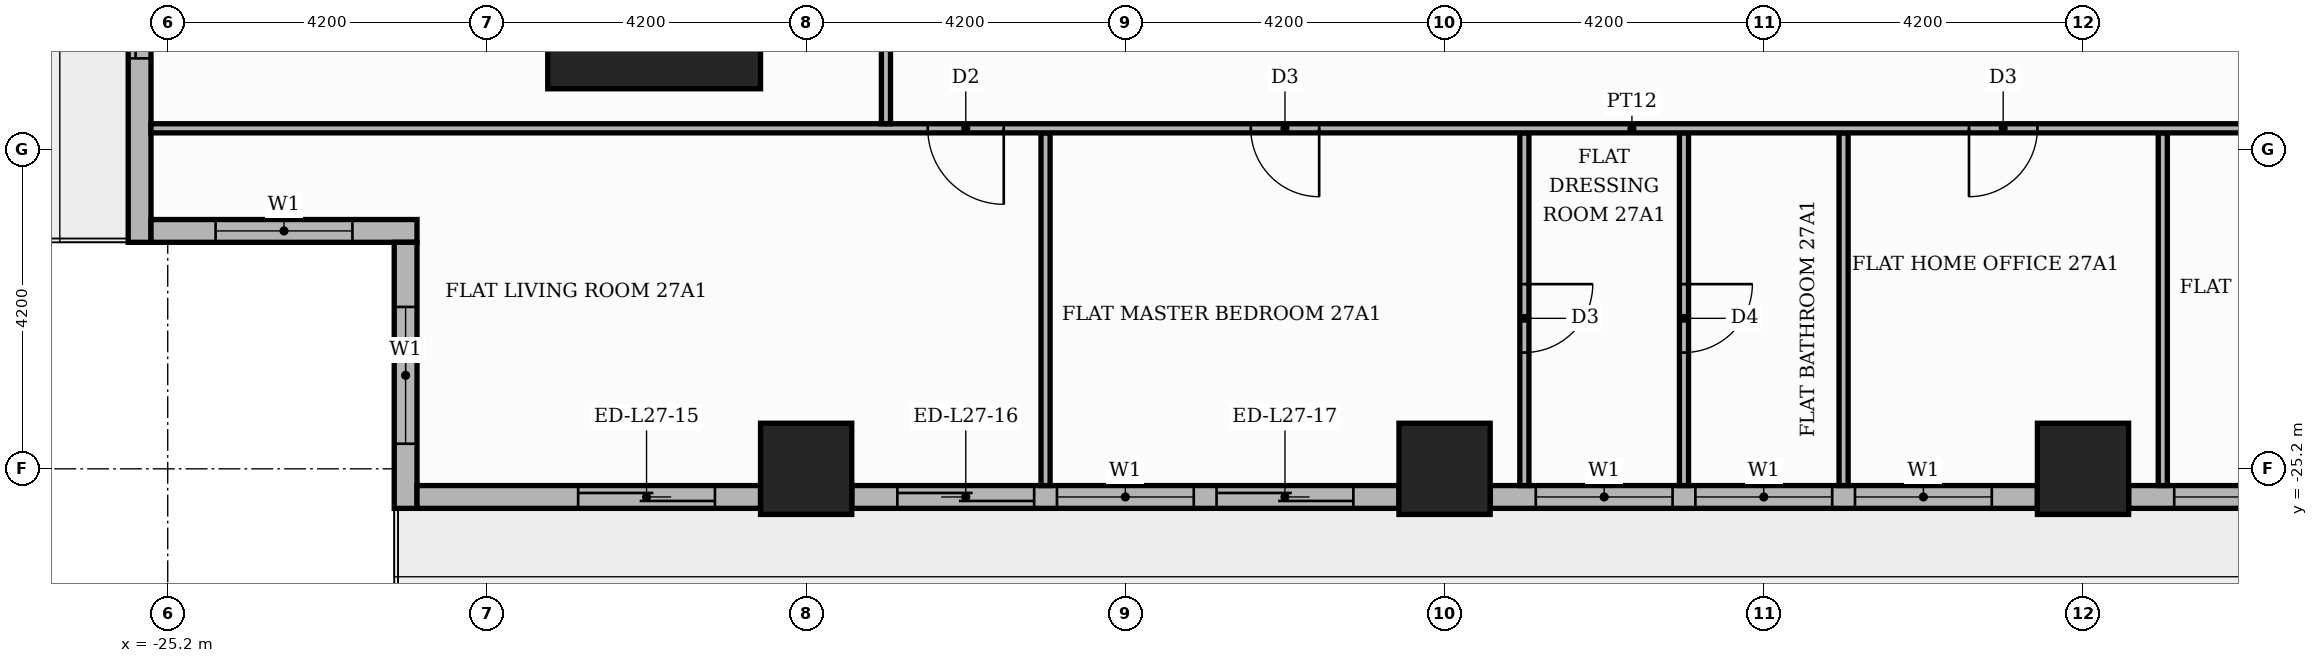
"""IFC4 building model, lengths in metres.
Left out: names, types, materials, properties, quantities, classifications, styles, units other than length and angle.
Written with IfcOpenShell. Run it as: python <this file> out.ifc"""

import sys

from ifc_helpers import new_model, si_unit, direction, frame, frame_2d, origin, origin_2d, place, context, subcontext, project, spatial, rectangle, extrude, element, fill, save


model = new_model("IFC4")
c1 = context("Model", 3, precision=1e-05, world=origin(), true_north=direction((0.0, 1.0)))
c2 = subcontext(c1, "Body", "Model", "MODEL_VIEW")
j1 = project(units=[si_unit("LENGTHUNIT", "METRE"), si_unit("PLANEANGLEUNIT", "RADIAN")], contexts=[c1])
p1 = place(None, origin())
s1 = spatial("IfcSite", under=j1, at=p1, CompositionType="ELEMENT")
p2 = place(p1, origin())
s2 = spatial("IfcBuilding", under=s1, at=p2, CompositionType="ELEMENT")
p3 = place(p2, frame((0.0, 0.0, 114.3)))
s3 = spatial("IfcBuildingStorey", under=s2, at=p3, CompositionType="ELEMENT", Elevation=114.3)
p4 = place(p3, frame((-18.8, -18.8, 0.0), z_axis=(0.0, 0.0, 1.0), x_axis=(1.0, 0.0, 0.0)))
e1 = element("IfcColumn", 1, at=p4, inside=s3, PredefinedType="COLUMN", context=c2, shape_type="SweptSolid", body=[
    extrude(rectangle(XDim=2.8, YDim=2.8, at=origin_2d()), origin(), (0.0, 0.0, 1.0), 3.9),
])
for number, where, z_axis, x_axis in (
    (2, (0.0, -25.2, 0.0), (0.0, 0.0, 1.0), (1.0, 0.0, 0.0)),
    (3, (-8.4, -25.2, 0.0), (0.0, 0.0, 1.0), (1.0, 0.0, 0.0)),
    (4, (-16.8, -25.2, 0.0), (0.0, 0.0, 1.0), (1.0, 0.0, 0.0)),
):
    element("IfcColumn", number, at=place(p3, frame(where, z_axis=z_axis, x_axis=x_axis)), inside=s3, PredefinedType="COLUMN", context=c2, shape_type="SweptSolid", body=[
        extrude(rectangle(XDim=1.2, YDim=1.2, at=origin_2d()), origin(), (0.0, 0.0, 1.0), 3.9),
    ])
p5 = place(p3, frame((-25.57, -17.4, 0.0), z_axis=(0.0, 0.0, 1.0), x_axis=(0.0, -1.0, 0.0)))
e5 = element("IfcWall", 5, at=p5, inside=s3, PredefinedType="STANDARD", context=c2, shape_type="SweptSolid", body=[
    extrude(rectangle(XDim=4.82, YDim=0.3, at=frame_2d((2.41, 0.0))), origin(), (0.0, 0.0, 1.0), 3.48),
])
p6 = place(p5, frame((0.6, 0.0, 0.0)))
e6 = element("IfcOpeningElement", 6, at=p6, cuts=e5, PredefinedType="OPENING", context=c2, shape_type="SweptSolid", body=[
    extrude(rectangle(XDim=1.8, YDim=2.4, at=frame_2d((0.9, 1.2))), frame((0.0, 0.16, 0.0), z_axis=(0.0, -1.0, 0.0), x_axis=(1.0, 0.0, 0.0)), (0.0, 0.0, 1.0), 0.32),
])
p7 = place(p3, frame((-25.42, -22.07, 0.0), z_axis=(0.0, 0.0, 1.0), x_axis=(1.0, 0.0, 0.0)))
e7 = element("IfcWall", 7, at=p7, inside=s3, PredefinedType="STANDARD", context=c2, shape_type="SweptSolid", body=[
    extrude(rectangle(XDim=3.5, YDim=0.3, at=frame_2d((1.75, 0.0))), origin(), (0.0, 0.0, 1.0), 3.48),
])
p8 = place(p7, frame((0.85, 0.0, 0.9)))
e8 = element("IfcOpeningElement", 8, at=p8, cuts=e7, PredefinedType="OPENING", context=c2, shape_type="SweptSolid", body=[
    extrude(rectangle(XDim=1.8, YDim=2.1, at=frame_2d((0.9, 1.05))), frame((0.0, 0.16, 0.0), z_axis=(0.0, -1.0, 0.0), x_axis=(1.0, 0.0, 0.0)), (0.0, 0.0, 1.0), 0.32),
])
p9 = place(p3, frame((-22.07, -22.22, 0.0), z_axis=(0.0, 0.0, 1.0), x_axis=(0.0, -1.0, 0.0)))
e9 = element("IfcWall", 9, at=p9, inside=s3, PredefinedType="STANDARD", context=c2, shape_type="SweptSolid", body=[
    extrude(rectangle(XDim=3.5, YDim=0.3, at=frame_2d((1.75, 0.0))), origin(), (0.0, 0.0, 1.0), 3.48),
])
p10 = place(p9, frame((0.85, 0.0, 0.9)))
e10 = element("IfcOpeningElement", 10, at=p10, cuts=e9, PredefinedType="OPENING", context=c2, shape_type="SweptSolid", body=[
    extrude(rectangle(XDim=1.8, YDim=2.1, at=frame_2d((0.9, 1.05))), frame((0.0, 0.16, 0.0), z_axis=(0.0, -1.0, 0.0), x_axis=(1.0, 0.0, 0.0)), (0.0, 0.0, 1.0), 0.32),
])
p11 = place(p3, frame((-21.92, -25.57, 0.0), z_axis=(0.0, 0.0, 1.0), x_axis=(1.0, 0.0, 0.0)))
e11 = element("IfcWall", 11, at=p11, inside=s3, PredefinedType="STANDARD", context=c2, shape_type="SweptSolid", body=[
    extrude(rectangle(XDim=4.52, YDim=0.3, at=frame_2d((2.26, 0.0))), origin(), (0.0, 0.0, 1.0), 3.48),
])
p12 = place(p11, frame((2.12, 0.0, 0.0)))
e12 = element("IfcOpeningElement", 12, at=p12, cuts=e11, PredefinedType="OPENING", context=c2, shape_type="SweptSolid", body=[
    extrude(rectangle(XDim=1.8, YDim=2.4, at=frame_2d((0.9, 1.2))), frame((0.0, 0.16, 0.0), z_axis=(0.0, -1.0, 0.0), x_axis=(1.0, 0.0, 0.0)), (0.0, 0.0, 1.0), 0.32),
])
p13 = place(p3, frame((-16.2, -25.57, 0.0), z_axis=(0.0, 0.0, 1.0), x_axis=(1.0, 0.0, 0.0)))
e13 = element("IfcWall", 13, at=p13, inside=s3, PredefinedType="STANDARD", context=c2, shape_type="SweptSolid", body=[
    extrude(rectangle(XDim=7.2, YDim=0.3, at=frame_2d((3.6, 0.0))), origin(), (0.0, 0.0, 1.0), 3.48),
])
p14 = place(p13, frame((0.6, 0.0, 0.0)))
e14 = element("IfcOpeningElement", 14, at=p14, cuts=e13, PredefinedType="OPENING", context=c2, shape_type="SweptSolid", body=[
    extrude(rectangle(XDim=1.8, YDim=2.4, at=frame_2d((0.9, 1.2))), frame((0.0, 0.16, 0.0), z_axis=(0.0, -1.0, 0.0), x_axis=(1.0, 0.0, 0.0)), (0.0, 0.0, 1.0), 0.32),
])
p15 = place(p13, frame((2.7, 0.0, 0.9)))
e15 = element("IfcOpeningElement", 15, at=p15, cuts=e13, PredefinedType="OPENING", context=c2, shape_type="SweptSolid", body=[
    extrude(rectangle(XDim=1.8, YDim=2.1, at=frame_2d((0.9, 1.05))), frame((0.0, 0.16, 0.0), z_axis=(0.0, -1.0, 0.0), x_axis=(1.0, 0.0, 0.0)), (0.0, 0.0, 1.0), 0.32),
])
p16 = place(p13, frame((4.8, 0.0, 0.0)))
e16 = element("IfcOpeningElement", 16, at=p16, cuts=e13, PredefinedType="OPENING", context=c2, shape_type="SweptSolid", body=[
    extrude(rectangle(XDim=1.8, YDim=2.4, at=frame_2d((0.9, 1.2))), frame((0.0, 0.16, 0.0), z_axis=(0.0, -1.0, 0.0), x_axis=(1.0, 0.0, 0.0)), (0.0, 0.0, 1.0), 0.32),
])
p17 = place(p3, frame((-7.8, -25.57, 0.0), z_axis=(0.0, 0.0, 1.0), x_axis=(1.0, 0.0, 0.0)))
e17 = element("IfcWall", 17, at=p17, inside=s3, PredefinedType="STANDARD", context=c2, shape_type="SweptSolid", body=[
    extrude(rectangle(XDim=7.2, YDim=0.3, at=frame_2d((3.6, 0.0))), origin(), (0.0, 0.0, 1.0), 3.48),
])
p18 = place(p17, frame((0.6, 0.0, 0.9)))
e18 = element("IfcOpeningElement", 18, at=p18, cuts=e17, PredefinedType="OPENING", context=c2, shape_type="SweptSolid", body=[
    extrude(rectangle(XDim=1.8, YDim=2.1, at=frame_2d((0.9, 1.05))), frame((0.0, 0.16, 0.0), z_axis=(0.0, -1.0, 0.0), x_axis=(1.0, 0.0, 0.0)), (0.0, 0.0, 1.0), 0.32),
])
p19 = place(p17, frame((2.7, 0.0, 0.9)))
e19 = element("IfcOpeningElement", 19, at=p19, cuts=e17, PredefinedType="OPENING", context=c2, shape_type="SweptSolid", body=[
    extrude(rectangle(XDim=1.8, YDim=2.1, at=frame_2d((0.9, 1.05))), frame((0.0, 0.16, 0.0), z_axis=(0.0, -1.0, 0.0), x_axis=(1.0, 0.0, 0.0)), (0.0, 0.0, 1.0), 0.32),
])
p20 = place(p17, frame((4.8, 0.0, 0.9)))
e20 = element("IfcOpeningElement", 20, at=p20, cuts=e17, PredefinedType="OPENING", context=c2, shape_type="SweptSolid", body=[
    extrude(rectangle(XDim=1.8, YDim=2.1, at=frame_2d((0.9, 1.05))), frame((0.0, 0.16, 0.0), z_axis=(0.0, -1.0, 0.0), x_axis=(1.0, 0.0, 0.0)), (0.0, 0.0, 1.0), 0.32),
])
p21 = place(p3, frame((0.6, -25.57, 0.0), z_axis=(0.0, 0.0, 1.0), x_axis=(1.0, 0.0, 0.0)))
e21 = element("IfcWall", 21, at=p21, inside=s3, PredefinedType="STANDARD", context=c2, shape_type="SweptSolid", body=[
    extrude(rectangle(XDim=7.2, YDim=0.3, at=frame_2d((3.6, 0.0))), origin(), (0.0, 0.0, 1.0), 3.48),
])
p22 = place(p21, frame((0.6, 0.0, 0.9)))
e22 = element("IfcOpeningElement", 22, at=p22, cuts=e21, PredefinedType="OPENING", context=c2, shape_type="SweptSolid", body=[
    extrude(rectangle(XDim=3.9, YDim=2.1, at=frame_2d((1.95, 1.05))), frame((0.0, 0.16, 0.0), z_axis=(0.0, -1.0, 0.0), x_axis=(1.0, 0.0, 0.0)), (0.0, 0.0, 1.0), 0.32),
])
p23 = place(p21, frame((4.8, 0.0, 0.9)))
e23 = element("IfcOpeningElement", 23, at=p23, cuts=e21, PredefinedType="OPENING", context=c2, shape_type="SweptSolid", body=[
    extrude(rectangle(XDim=1.8, YDim=2.1, at=frame_2d((0.9, 1.05))), frame((0.0, 0.16, 0.0), z_axis=(0.0, -1.0, 0.0), x_axis=(1.0, 0.0, 0.0)), (0.0, 0.0, 1.0), 0.32),
])
p24 = place(p3, frame((-13.65, -25.42, 0.0), z_axis=(0.0, 0.0, 1.0), x_axis=(0.0, 1.0, 0.0)))
e24 = element("IfcWall", 24, at=p24, inside=s3, PredefinedType="PARTITIONING", context=c2, shape_type="SweptSolid", body=[
    extrude(rectangle(XDim=4.64, YDim=0.12, at=frame_2d((2.32, 0.0))), origin(), (0.0, 0.0, 1.0), 3.48),
])
p25 = place(p3, frame((-7.35, -25.42, 0.0), z_axis=(0.0, 0.0, 1.0), x_axis=(0.0, 1.0, 0.0)))
e25 = element("IfcWall", 25, at=p25, inside=s3, PredefinedType="PARTITIONING", context=c2, shape_type="SweptSolid", body=[
    extrude(rectangle(XDim=4.64, YDim=0.12, at=frame_2d((2.32, 0.0))), origin(), (0.0, 0.0, 1.0), 3.48),
])
p26 = place(p25, frame((1.75, 0.0, 0.0)))
e26 = element("IfcOpeningElement", 26, at=p26, cuts=e25, PredefinedType="OPENING", context=c2, shape_type="SweptSolid", body=[
    extrude(rectangle(XDim=0.9, YDim=2.1, at=frame_2d((0.45, 1.05))), frame((0.0, 0.07, 0.0), z_axis=(0.0, -1.0, 0.0), x_axis=(1.0, 0.0, 0.0)), (0.0, 0.0, 1.0), 0.14),
])
p27 = place(p3, frame((-5.25, -25.42, 0.0), z_axis=(0.0, 0.0, 1.0), x_axis=(0.0, 1.0, 0.0)))
e27 = element("IfcWall", 27, at=p27, inside=s3, PredefinedType="PARTITIONING", context=c2, shape_type="SweptSolid", body=[
    extrude(rectangle(XDim=4.64, YDim=0.12, at=frame_2d((2.32, 0.0))), origin(), (0.0, 0.0, 1.0), 3.48),
])
p28 = place(p27, frame((1.75, 0.0, 0.0)))
e28 = element("IfcOpeningElement", 28, at=p28, cuts=e27, PredefinedType="OPENING", context=c2, shape_type="SweptSolid", body=[
    extrude(rectangle(XDim=0.9, YDim=2.1, at=frame_2d((0.45, 1.05))), frame((0.0, 0.07, 0.0), z_axis=(0.0, -1.0, 0.0), x_axis=(1.0, 0.0, 0.0)), (0.0, 0.0, 1.0), 0.14),
])
for number, where, z_axis, x_axis in (
    (29, (-3.15, -25.42, 0.0), (0.0, 0.0, 1.0), (0.0, 1.0, 0.0)),
    (30, (1.05, -25.42, 0.0), (0.0, 0.0, 1.0), (0.0, 1.0, 0.0)),
):
    element("IfcWall", number, at=place(p3, frame(where, z_axis=z_axis, x_axis=x_axis)), inside=s3, PredefinedType="PARTITIONING", context=c2, shape_type="SweptSolid", body=[
        extrude(rectangle(XDim=4.64, YDim=0.12, at=frame_2d((2.32, 0.0))), origin(), (0.0, 0.0, 1.0), 3.48),
    ])
p29 = place(p3, frame((-25.42, -20.72, 0.0), z_axis=(0.0, 0.0, 1.0), x_axis=(1.0, 0.0, 0.0)))
e31 = element("IfcWall", 31, at=p29, inside=s3, PredefinedType="PARTITIONING", context=c2, shape_type="SweptSolid", body=[
    extrude(rectangle(XDim=38.97, YDim=0.12, at=frame_2d((19.485, 0.0))), origin(), (0.0, 0.0, 1.0), 3.48),
])
p30 = place(p29, frame((10.22, 0.0, 0.0)))
e32 = element("IfcOpeningElement", 32, at=p30, cuts=e31, PredefinedType="OPENING", context=c2, shape_type="SweptSolid", body=[
    extrude(rectangle(XDim=1.0, YDim=2.1, at=frame_2d((0.5, 1.05))), frame((0.0, 0.07, 0.0), z_axis=(0.0, -1.0, 0.0), x_axis=(1.0, 0.0, 0.0)), (0.0, 0.0, 1.0), 0.14),
])
p31 = place(p29, frame((14.47, 0.0, 0.0)))
e33 = element("IfcOpeningElement", 33, at=p31, cuts=e31, PredefinedType="OPENING", context=c2, shape_type="SweptSolid", body=[
    extrude(rectangle(XDim=0.9, YDim=2.1, at=frame_2d((0.45, 1.05))), frame((0.0, 0.07, 0.0), z_axis=(0.0, -1.0, 0.0), x_axis=(1.0, 0.0, 0.0)), (0.0, 0.0, 1.0), 0.14),
])
p32 = place(p29, frame((23.92, 0.0, 0.0)))
e34 = element("IfcOpeningElement", 34, at=p32, cuts=e31, PredefinedType="OPENING", context=c2, shape_type="SweptSolid", body=[
    extrude(rectangle(XDim=0.9, YDim=2.1, at=frame_2d((0.45, 1.05))), frame((0.0, 0.07, 0.0), z_axis=(0.0, -1.0, 0.0), x_axis=(1.0, 0.0, 0.0)), (0.0, 0.0, 1.0), 0.14),
])
p33 = place(p29, frame((28.12, 0.0, 0.0)))
e35 = element("IfcOpeningElement", 35, at=p33, cuts=e31, PredefinedType="OPENING", context=c2, shape_type="SweptSolid", body=[
    extrude(rectangle(XDim=0.9, YDim=2.1, at=frame_2d((0.45, 1.05))), frame((0.0, 0.07, 0.0), z_axis=(0.0, -1.0, 0.0), x_axis=(1.0, 0.0, 0.0)), (0.0, 0.0, 1.0), 0.14),
])
p34 = place(p29, frame((34.42, 0.0, 0.0)))
e36 = element("IfcOpeningElement", 36, at=p34, cuts=e31, PredefinedType="OPENING", context=c2, shape_type="SweptSolid", body=[
    extrude(rectangle(XDim=0.9, YDim=2.1, at=frame_2d((0.45, 1.05))), frame((0.0, 0.07, 0.0), z_axis=(0.0, -1.0, 0.0), x_axis=(1.0, 0.0, 0.0)), (0.0, 0.0, 1.0), 0.14),
])
p35 = place(p3, frame((-15.75, -20.66, 0.0), z_axis=(0.0, 0.0, 1.0), x_axis=(0.0, 1.0, 0.0)))
e37 = element("IfcWall", 37, at=p35, inside=s3, PredefinedType="PARTITIONING", context=c2, shape_type="SweptSolid", body=[
    extrude(rectangle(XDim=6.91, YDim=0.12, at=frame_2d((3.455, 0.0))), origin(), (0.0, 0.0, 1.0), 3.48),
])
p36 = place(p35, frame((3.025, 0.0, 0.0)))
e38 = element("IfcOpeningElement", 38, at=p36, cuts=e37, PredefinedType="OPENING", context=c2, shape_type="SweptSolid", body=[
    extrude(rectangle(XDim=0.9, YDim=2.1, at=frame_2d((0.45, 1.05))), frame((0.0, 0.07, 0.0), z_axis=(0.0, -1.0, 0.0), x_axis=(1.0, 0.0, 0.0)), (0.0, 0.0, 1.0), 0.14),
])
p37 = place(p6, origin())
e39 = element("IfcDoor", 39, at=p37, inside=s3, OperationType="SLIDING_TO_LEFT", PredefinedType="DOOR", context=c2, shape_type="SweptSolid", body=[
    extrude(rectangle(XDim=1.8, YDim=2.4, at=frame_2d((0.9, 1.2))), frame((0.0, 0.025, 0.0), z_axis=(0.0, -1.0, 0.0), x_axis=(1.0, 0.0, 0.0)), (0.0, 0.0, 1.0), 0.05),
])
fill(e6, e39)
p38 = place(p8, origin())
e40 = element("IfcWindow", 40, at=p38, inside=s3, PartitioningType="SINGLE_PANEL", PredefinedType="WINDOW", context=c2, shape_type="SweptSolid", body=[
    extrude(rectangle(XDim=1.8, YDim=2.1, at=frame_2d((0.9, 1.05))), frame((0.0, 0.03, 0.0), z_axis=(0.0, -1.0, 0.0), x_axis=(1.0, 0.0, 0.0)), (0.0, 0.0, 1.0), 0.06),
])
fill(e8, e40)
p39 = place(p10, origin())
e41 = element("IfcWindow", 41, at=p39, inside=s3, PartitioningType="SINGLE_PANEL", PredefinedType="WINDOW", context=c2, shape_type="SweptSolid", body=[
    extrude(rectangle(XDim=1.8, YDim=2.1, at=frame_2d((0.9, 1.05))), frame((0.0, 0.03, 0.0), z_axis=(0.0, -1.0, 0.0), x_axis=(1.0, 0.0, 0.0)), (0.0, 0.0, 1.0), 0.06),
])
fill(e10, e41)
p40 = place(p12, origin())
e42 = element("IfcDoor", 42, at=p40, inside=s3, OperationType="SLIDING_TO_RIGHT", PredefinedType="DOOR", context=c2, shape_type="SweptSolid", body=[
    extrude(rectangle(XDim=1.8, YDim=2.4, at=frame_2d((0.9, 1.2))), frame((0.0, 0.025, 0.0), z_axis=(0.0, -1.0, 0.0), x_axis=(1.0, 0.0, 0.0)), (0.0, 0.0, 1.0), 0.05),
])
fill(e12, e42)
p41 = place(p14, origin())
e43 = element("IfcDoor", 43, at=p41, inside=s3, OperationType="SLIDING_TO_LEFT", PredefinedType="DOOR", context=c2, shape_type="SweptSolid", body=[
    extrude(rectangle(XDim=1.8, YDim=2.4, at=frame_2d((0.9, 1.2))), frame((0.0, 0.025, 0.0), z_axis=(0.0, -1.0, 0.0), x_axis=(1.0, 0.0, 0.0)), (0.0, 0.0, 1.0), 0.05),
])
fill(e14, e43)
p42 = place(p15, origin())
e44 = element("IfcWindow", 44, at=p42, inside=s3, PartitioningType="SINGLE_PANEL", PredefinedType="WINDOW", context=c2, shape_type="SweptSolid", body=[
    extrude(rectangle(XDim=1.8, YDim=2.1, at=frame_2d((0.9, 1.05))), frame((0.0, 0.03, 0.0), z_axis=(0.0, -1.0, 0.0), x_axis=(1.0, 0.0, 0.0)), (0.0, 0.0, 1.0), 0.06),
])
fill(e15, e44)
p43 = place(p16, origin())
e45 = element("IfcDoor", 45, at=p43, inside=s3, OperationType="SLIDING_TO_RIGHT", PredefinedType="DOOR", context=c2, shape_type="SweptSolid", body=[
    extrude(rectangle(XDim=1.8, YDim=2.4, at=frame_2d((0.9, 1.2))), frame((0.0, 0.025, 0.0), z_axis=(0.0, -1.0, 0.0), x_axis=(1.0, 0.0, 0.0)), (0.0, 0.0, 1.0), 0.05),
])
fill(e16, e45)
p44 = place(p18, origin())
e46 = element("IfcWindow", 46, at=p44, inside=s3, PartitioningType="SINGLE_PANEL", PredefinedType="WINDOW", context=c2, shape_type="SweptSolid", body=[
    extrude(rectangle(XDim=1.8, YDim=2.1, at=frame_2d((0.9, 1.05))), frame((0.0, 0.03, 0.0), z_axis=(0.0, -1.0, 0.0), x_axis=(1.0, 0.0, 0.0)), (0.0, 0.0, 1.0), 0.06),
])
fill(e18, e46)
p45 = place(p19, origin())
e47 = element("IfcWindow", 47, at=p45, inside=s3, PartitioningType="SINGLE_PANEL", PredefinedType="WINDOW", context=c2, shape_type="SweptSolid", body=[
    extrude(rectangle(XDim=1.8, YDim=2.1, at=frame_2d((0.9, 1.05))), frame((0.0, 0.03, 0.0), z_axis=(0.0, -1.0, 0.0), x_axis=(1.0, 0.0, 0.0)), (0.0, 0.0, 1.0), 0.06),
])
fill(e19, e47)
p46 = place(p20, origin())
e48 = element("IfcWindow", 48, at=p46, inside=s3, PartitioningType="SINGLE_PANEL", PredefinedType="WINDOW", context=c2, shape_type="SweptSolid", body=[
    extrude(rectangle(XDim=1.8, YDim=2.1, at=frame_2d((0.9, 1.05))), frame((0.0, 0.03, 0.0), z_axis=(0.0, -1.0, 0.0), x_axis=(1.0, 0.0, 0.0)), (0.0, 0.0, 1.0), 0.06),
])
fill(e20, e48)
p47 = place(p22, origin())
e49 = element("IfcWindow", 49, at=p47, inside=s3, PartitioningType="SINGLE_PANEL", PredefinedType="WINDOW", context=c2, shape_type="SweptSolid", body=[
    extrude(rectangle(XDim=3.9, YDim=2.1, at=frame_2d((1.95, 1.05))), frame((0.0, 0.03, 0.0), z_axis=(0.0, -1.0, 0.0), x_axis=(1.0, 0.0, 0.0)), (0.0, 0.0, 1.0), 0.06),
])
fill(e22, e49)
p48 = place(p30, frame((1.0, 0.0, 0.0), z_axis=(0.0, 0.0, 1.0), x_axis=(-1.0, 0.0, 0.0)))
e50 = element("IfcDoor", 50, at=p48, inside=s3, OperationType="SINGLE_SWING_RIGHT", PredefinedType="DOOR", context=c2, shape_type="SweptSolid", body=[
    extrude(rectangle(XDim=1.0, YDim=2.1, at=frame_2d((0.5, 1.05))), frame((0.0, 0.025, 0.0), z_axis=(0.0, -1.0, 0.0), x_axis=(1.0, 0.0, 0.0)), (0.0, 0.0, 1.0), 0.05),
])
fill(e32, e50)
p49 = place(p31, frame((0.9, 0.0, 0.0), z_axis=(0.0, 0.0, 1.0), x_axis=(-1.0, 0.0, 0.0)))
e51 = element("IfcDoor", 51, at=p49, inside=s3, OperationType="SINGLE_SWING_RIGHT", PredefinedType="DOOR", context=c2, shape_type="SweptSolid", body=[
    extrude(rectangle(XDim=0.9, YDim=2.1, at=frame_2d((0.45, 1.05))), frame((0.0, 0.025, 0.0), z_axis=(0.0, -1.0, 0.0), x_axis=(1.0, 0.0, 0.0)), (0.0, 0.0, 1.0), 0.05),
])
fill(e33, e51)
p50 = place(p26, frame((0.9, 0.0, 0.0), z_axis=(0.0, 0.0, 1.0), x_axis=(-1.0, 0.0, 0.0)))
e52 = element("IfcDoor", 52, at=p50, inside=s3, OperationType="SINGLE_SWING_RIGHT", PredefinedType="DOOR", context=c2, shape_type="SweptSolid", body=[
    extrude(rectangle(XDim=0.9, YDim=2.1, at=frame_2d((0.45, 1.05))), frame((0.0, 0.025, 0.0), z_axis=(0.0, -1.0, 0.0), x_axis=(1.0, 0.0, 0.0)), (0.0, 0.0, 1.0), 0.05),
])
fill(e26, e52)
p51 = place(p28, frame((0.9, 0.0, 0.0), z_axis=(0.0, 0.0, 1.0), x_axis=(-1.0, 0.0, 0.0)))
e53 = element("IfcDoor", 53, at=p51, inside=s3, OperationType="SINGLE_SWING_RIGHT", PredefinedType="DOOR", context=c2, shape_type="SweptSolid", body=[
    extrude(rectangle(XDim=0.9, YDim=2.1, at=frame_2d((0.45, 1.05))), frame((0.0, 0.025, 0.0), z_axis=(0.0, -1.0, 0.0), x_axis=(1.0, 0.0, 0.0)), (0.0, 0.0, 1.0), 0.05),
])
fill(e28, e53)
p52 = place(p32, frame((0.9, 0.0, 0.0), z_axis=(0.0, 0.0, 1.0), x_axis=(-1.0, 0.0, 0.0)))
e54 = element("IfcDoor", 54, at=p52, inside=s3, OperationType="SINGLE_SWING_LEFT", PredefinedType="DOOR", context=c2, shape_type="SweptSolid", body=[
    extrude(rectangle(XDim=0.9, YDim=2.1, at=frame_2d((0.45, 1.05))), frame((0.0, 0.025, 0.0), z_axis=(0.0, -1.0, 0.0), x_axis=(1.0, 0.0, 0.0)), (0.0, 0.0, 1.0), 0.05),
])
fill(e34, e54)
save(model, sys.argv[1])
